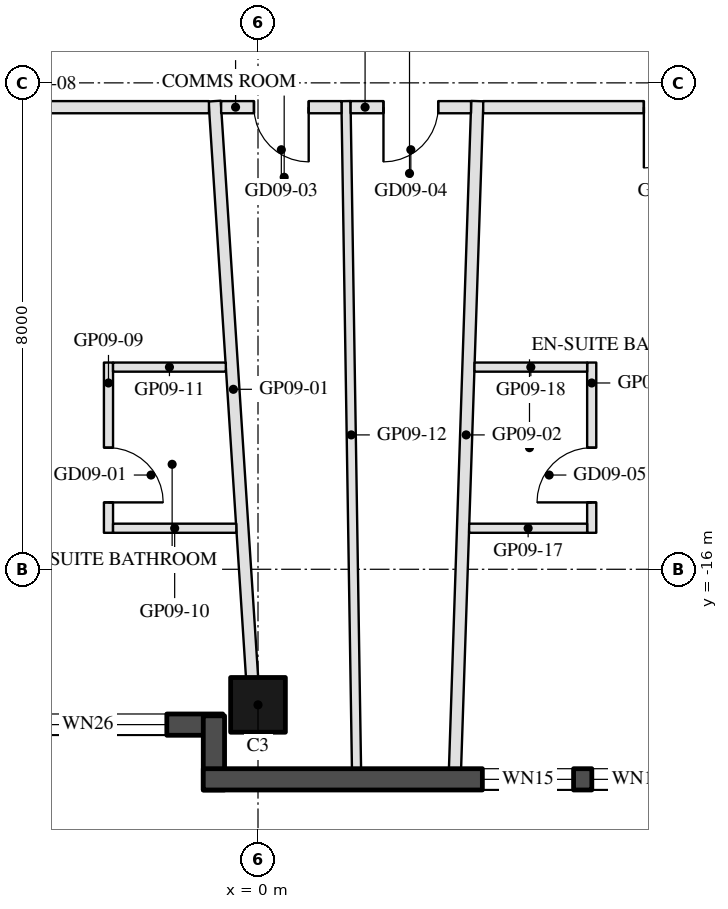
"""IFC4 building model, lengths in metres.
Left out: names, types, materials, properties, quantities, classifications, styles, units other than length and angle.
Written with IfcOpenShell. Run it as: python <this file> out.ifc"""

import sys

from ifc_helpers import new_model, si_unit, direction, frame, frame_2d, origin, origin_2d, place, context, subcontext, project, spatial, rectangle, hollow_rectangle, extrude, element, fill, save


model = new_model("IFC4")
c1 = context("Model", 3, precision=1e-05, world=origin(), true_north=direction((0.0, 1.0)))
c2 = subcontext(c1, "Body", "Model", "MODEL_VIEW")
j1 = project(units=[si_unit("LENGTHUNIT", "METRE"), si_unit("PLANEANGLEUNIT", "RADIAN")], contexts=[c1])
p1 = place(None, origin())
s1 = spatial("IfcSite", under=j1, at=p1, CompositionType="ELEMENT")
p2 = place(p1, origin())
s2 = spatial("IfcBuilding", under=s1, at=p2, CompositionType="ELEMENT")
p3 = place(p2, frame((0.0, 0.0, 109.4)))
s3 = spatial("IfcBuildingStorey", under=s2, at=p3, CompositionType="ELEMENT", Elevation=109.4)
p4 = place(p3, frame((0.0, -18.23, 0.0), z_axis=(0.0, 0.0, 1.0), x_axis=(-1.0, 0.0, 0.0)))
e1 = element("IfcColumn", 1, at=p4, inside=s3, PredefinedType="COLUMN", context=c2, shape_type="SweptSolid", body=[
    extrude(hollow_rectangle(XDim=0.9, YDim=0.9, WallThickness=0.04, at=origin_2d()), origin(), (0.0, 0.0, 1.0), 3.7),
])
p5 = place(p3, frame((-7.32, -18.555, 0.0), z_axis=(0.0, 0.0, 1.0), x_axis=(1.0, 0.0, 0.0)))
e2 = element("IfcWall", 2, at=p5, inside=s3, PredefinedType="SOLIDWALL", context=c2, shape_type="SweptSolid", body=[
    extrude(rectangle(XDim=6.74, YDim=0.35, at=frame_2d((3.37, 0.0))), origin(), (0.0, 0.0, 1.0), 3.55),
])
p6 = place(p5, frame((0.32, 0.0, 0.3)))
e3 = element("IfcOpeningElement", 3, at=p6, cuts=e2, PredefinedType="OPENING", context=c2, shape_type="SweptSolid", body=[
    extrude(rectangle(XDim=2.6, YDim=2.65, at=frame_2d((1.3, 1.325))), frame((0.0, 0.185, 0.0), z_axis=(0.0, -1.0, 0.0), x_axis=(1.0, 0.0, 0.0)), (0.0, 0.0, 1.0), 0.37),
])
p7 = place(p5, frame((3.22, 0.0, 0.3)))
e4 = element("IfcOpeningElement", 4, at=p7, cuts=e2, PredefinedType="OPENING", context=c2, shape_type="SweptSolid", body=[
    extrude(rectangle(XDim=2.6, YDim=2.65, at=frame_2d((1.3, 1.325))), frame((0.0, 0.185, 0.0), z_axis=(0.0, -1.0, 0.0), x_axis=(1.0, 0.0, 0.0)), (0.0, 0.0, 1.0), 0.37),
])
p8 = place(p3, frame((-0.725, -18.41, 0.0), z_axis=(0.0, 0.0, 1.0), x_axis=(0.0, -1.0, 0.0)))
e5 = element("IfcWall", 5, at=p8, inside=s3, PredefinedType="SOLIDWALL", context=c2, shape_type="SweptSolid", body=[
    extrude(rectangle(XDim=1.22, YDim=0.35, at=frame_2d((0.61, 0.0))), origin(), (0.0, 0.0, 1.0), 3.55),
])
p9 = place(p3, frame((-0.9, -19.455, 0.0), z_axis=(0.0, 0.0, 1.0), x_axis=(1.0, 0.0, 0.0)))
e6 = element("IfcWall", 6, at=p9, inside=s3, PredefinedType="SOLIDWALL", context=c2, shape_type="SweptSolid", body=[
    extrude(rectangle(XDim=9.7, YDim=0.35, at=frame_2d((4.85, 0.0))), origin(), (0.0, 0.0, 1.0), 3.55),
])
p10 = place(p9, frame((4.59, 0.0, 0.3)))
e7 = element("IfcOpeningElement", 7, at=p10, cuts=e6, PredefinedType="OPENING", context=c2, shape_type="SweptSolid", body=[
    extrude(rectangle(XDim=1.5, YDim=2.65, at=frame_2d((0.75, 1.325))), frame((0.0, 0.185, 0.0), z_axis=(0.0, -1.0, 0.0), x_axis=(1.0, 0.0, 0.0)), (0.0, 0.0, 1.0), 0.37),
])
p11 = place(p9, frame((6.39, 0.0, 0.3)))
e8 = element("IfcOpeningElement", 8, at=p11, cuts=e6, PredefinedType="OPENING", context=c2, shape_type="SweptSolid", body=[
    extrude(rectangle(XDim=1.5, YDim=2.65, at=frame_2d((0.75, 1.325))), frame((0.0, 0.185, 0.0), z_axis=(0.0, -1.0, 0.0), x_axis=(1.0, 0.0, 0.0)), (0.0, 0.0, 1.0), 0.37),
])
p12 = place(p3, frame((-0.097, -17.78, 0.0), z_axis=(0.0, 0.0, 1.0), x_axis=(-0.064787627283, 0.997899074732, 0.0)))
e9 = element("IfcWall", 9, at=p12, inside=s3, PredefinedType="PARTITIONING", context=c2, shape_type="SweptSolid", body=[
    extrude(rectangle(XDim=9.5, YDim=0.2, at=frame_2d((4.75, 0.0))), origin(), (0.0, 0.0, 1.0), 2.95),
])
p13 = place(p3, frame((3.24, -19.28, 0.0), z_axis=(0.0, 0.0, 1.0), x_axis=(0.033378464475, 0.99944278381, 0.0)))
e10 = element("IfcWall", 10, at=p13, inside=s3, PredefinedType="PARTITIONING", context=c2, shape_type="SweptSolid", body=[
    extrude(rectangle(XDim=10.986, YDim=0.2, at=frame_2d((5.493, 0.0))), origin(), (0.0, 0.0, 1.0), 2.96),
])
p14 = place(p3, frame((-0.807, -8.4, 0.0), z_axis=(0.0, 0.0, 1.0), x_axis=(-1.0, 0.0, 0.0)))
e11 = element("IfcWall", 11, at=p14, inside=s3, PredefinedType="PARTITIONING", context=c2, shape_type="SweptSolid", body=[
    extrude(rectangle(XDim=9.182, YDim=0.2, at=frame_2d((4.591, 0.0))), origin(), (0.0, 0.0, 1.0), 2.95),
])
p15 = place(p14, frame((4.091, 0.0, 0.0)))
e12 = element("IfcOpeningElement", 12, at=p15, cuts=e11, PredefinedType="OPENING", context=c2, shape_type="SweptSolid", body=[
    extrude(rectangle(XDim=1.0, YDim=2.1, at=frame_2d((0.5, 1.05))), frame((0.0, 0.11, 0.0), z_axis=(0.0, -1.0, 0.0), x_axis=(1.0, 0.0, 0.0)), (0.0, 0.0, 1.0), 0.22),
])
p16 = place(p3, frame((-2.459, -12.6, 0.0), z_axis=(0.0, 0.0, 1.0), x_axis=(0.0, -1.0, 0.0)))
e13 = element("IfcWall", 13, at=p16, inside=s3, PredefinedType="PARTITIONING", context=c2, shape_type="SweptSolid", body=[
    extrude(rectangle(XDim=2.8, YDim=0.15, at=frame_2d((1.4, 0.0))), origin(), (0.0, 0.0, 1.0), 3.55),
])
p17 = place(p16, frame((1.4, 0.0, 0.0)))
e14 = element("IfcOpeningElement", 14, at=p17, cuts=e13, PredefinedType="OPENING", context=c2, shape_type="SweptSolid", body=[
    extrude(rectangle(XDim=0.9, YDim=2.1, at=frame_2d((0.45, 1.05))), frame((0.0, 0.085, 0.0), z_axis=(0.0, -1.0, 0.0), x_axis=(1.0, 0.0, 0.0)), (0.0, 0.0, 1.0), 0.17),
])
p18 = place(p3, frame((-2.384, -15.325, 0.0), z_axis=(0.0, 0.0, 1.0), x_axis=(1.0, 0.0, 0.0)))
e15 = element("IfcWall", 15, at=p18, inside=s3, PredefinedType="PARTITIONING", context=c2, shape_type="SweptSolid", body=[
    extrude(rectangle(XDim=2.027, YDim=0.15, at=frame_2d((1.014, 0.0))), origin(), (0.0, 0.0, 1.0), 3.55),
])
p19 = place(p3, frame((-2.384, -12.675, 0.0), z_axis=(0.0, 0.0, 1.0), x_axis=(1.0, 0.0, 0.0)))
e16 = element("IfcWall", 16, at=p19, inside=s3, PredefinedType="PARTITIONING", context=c2, shape_type="SweptSolid", body=[
    extrude(rectangle(XDim=1.855, YDim=0.15, at=frame_2d((0.927, 0.0))), origin(), (0.0, 0.0, 1.0), 3.55),
])
p20 = place(p3, frame((1.62, -19.28, 0.0), z_axis=(0.0, 0.0, 1.0), x_axis=(-0.015784932211, 0.999875410196, 0.0)))
e17 = element("IfcWall", 17, at=p20, inside=s3, PredefinedType="PARTITIONING", context=c2, shape_type="SweptSolid", body=[
    extrude(rectangle(XDim=10.981, YDim=0.15, at=frame_2d((5.491, 0.0))), origin(), (0.0, 0.0, 1.0), 2.96),
])
p21 = place(p3, frame((1.373, -8.4, 0.0), z_axis=(0.0, 0.0, 1.0), x_axis=(-1.0, 0.0, 0.0)))
e18 = element("IfcWall", 18, at=p21, inside=s3, PredefinedType="PARTITIONING", context=c2, shape_type="SweptSolid", body=[
    extrude(rectangle(XDim=1.979, YDim=0.2, at=frame_2d((0.99, 0.0))), origin(), (0.0, 0.0, 1.0), 2.95),
])
p22 = place(p21, frame((0.54, 0.0, 0.0)))
e19 = element("IfcOpeningElement", 19, at=p22, cuts=e18, PredefinedType="OPENING", context=c2, shape_type="SweptSolid", body=[
    extrude(rectangle(XDim=0.9, YDim=2.1, at=frame_2d((0.45, 1.05))), frame((0.0, 0.11, 0.0), z_axis=(0.0, -1.0, 0.0), x_axis=(1.0, 0.0, 0.0)), (0.0, 0.0, 1.0), 0.22),
])
p23 = place(p3, frame((3.503, -8.4, 0.0), z_axis=(0.0, 0.0, 1.0), x_axis=(-1.0, 0.0, 0.0)))
e20 = element("IfcWall", 20, at=p23, inside=s3, PredefinedType="PARTITIONING", context=c2, shape_type="SweptSolid", body=[
    extrude(rectangle(XDim=1.98, YDim=0.2, at=frame_2d((0.99, 0.0))), origin(), (0.0, 0.0, 1.0), 3.55),
])
p24 = place(p23, frame((0.54, 0.0, 0.0)))
e21 = element("IfcOpeningElement", 21, at=p24, cuts=e20, PredefinedType="OPENING", context=c2, shape_type="SweptSolid", body=[
    extrude(rectangle(XDim=0.9, YDim=2.1, at=frame_2d((0.45, 1.05))), frame((0.0, 0.11, 0.0), z_axis=(0.0, -1.0, 0.0), x_axis=(1.0, 0.0, 0.0)), (0.0, 0.0, 1.0), 0.22),
])
p25 = place(p3, frame((9.988, -8.4, 0.0), z_axis=(0.0, 0.0, 1.0), x_axis=(-1.0, 0.0, 0.0)))
e22 = element("IfcWall", 22, at=p25, inside=s3, PredefinedType="PARTITIONING", context=c2, shape_type="SweptSolid", body=[
    extrude(rectangle(XDim=6.285, YDim=0.2, at=frame_2d((3.143, 0.0))), origin(), (0.0, 0.0, 1.0), 2.95),
])
p26 = place(p25, frame((2.642, 0.0, 0.0)))
e23 = element("IfcOpeningElement", 23, at=p26, cuts=e22, PredefinedType="OPENING", context=c2, shape_type="SweptSolid", body=[
    extrude(rectangle(XDim=1.0, YDim=2.1, at=frame_2d((0.5, 1.05))), frame((0.0, 0.11, 0.0), z_axis=(0.0, -1.0, 0.0), x_axis=(1.0, 0.0, 0.0)), (0.0, 0.0, 1.0), 0.22),
])
p27 = place(p3, frame((5.488, -15.4, 0.0), z_axis=(0.0, 0.0, 1.0), x_axis=(0.0, 1.0, 0.0)))
e24 = element("IfcWall", 24, at=p27, inside=s3, PredefinedType="PARTITIONING", context=c2, shape_type="SweptSolid", body=[
    extrude(rectangle(XDim=2.8, YDim=0.15, at=frame_2d((1.4, 0.0))), origin(), (0.0, 0.0, 1.0), 3.55),
])
p28 = place(p27, frame((0.5, 0.0, 0.0)))
e25 = element("IfcOpeningElement", 25, at=p28, cuts=e24, PredefinedType="OPENING", context=c2, shape_type="SweptSolid", body=[
    extrude(rectangle(XDim=0.9, YDim=2.1, at=frame_2d((0.45, 1.05))), frame((0.0, 0.085, 0.0), z_axis=(0.0, -1.0, 0.0), x_axis=(1.0, 0.0, 0.0)), (0.0, 0.0, 1.0), 0.17),
])
p29 = place(p3, frame((3.472, -15.325, 0.0), z_axis=(0.0, 0.0, 1.0), x_axis=(1.0, 0.0, 0.0)))
e26 = element("IfcWall", 26, at=p29, inside=s3, PredefinedType="PARTITIONING", context=c2, shape_type="SweptSolid", body=[
    extrude(rectangle(XDim=1.941, YDim=0.15, at=frame_2d((0.97, 0.0))), origin(), (0.0, 0.0, 1.0), 2.95),
])
p30 = place(p3, frame((3.561, -12.675, 0.0), z_axis=(0.0, 0.0, 1.0), x_axis=(1.0, 0.0, 0.0)))
e27 = element("IfcWall", 27, at=p30, inside=s3, PredefinedType="PARTITIONING", context=c2, shape_type="SweptSolid", body=[
    extrude(rectangle(XDim=1.853, YDim=0.15, at=frame_2d((0.926, 0.0))), origin(), (0.0, 0.0, 1.0), 2.95),
])
p31 = place(p7, origin())
e28 = element("IfcWindow", 28, at=p31, inside=s3, PartitioningType="SINGLE_PANEL", PredefinedType="WINDOW", context=c2, shape_type="SweptSolid", body=[
    extrude(rectangle(XDim=2.6, YDim=2.65, at=frame_2d((1.3, 1.325))), frame((0.0, 0.03, 0.0), z_axis=(0.0, -1.0, 0.0), x_axis=(1.0, 0.0, 0.0)), (0.0, 0.0, 1.0), 0.06),
])
fill(e4, e28)
p32 = place(p10, origin())
e29 = element("IfcWindow", 29, at=p32, inside=s3, PartitioningType="SINGLE_PANEL", PredefinedType="WINDOW", context=c2, shape_type="SweptSolid", body=[
    extrude(rectangle(XDim=1.5, YDim=2.65, at=frame_2d((0.75, 1.325))), frame((0.0, 0.03, 0.0), z_axis=(0.0, -1.0, 0.0), x_axis=(1.0, 0.0, 0.0)), (0.0, 0.0, 1.0), 0.06),
])
fill(e7, e29)
p33 = place(p11, origin())
e30 = element("IfcWindow", 30, at=p33, inside=s3, PartitioningType="SINGLE_PANEL", PredefinedType="WINDOW", context=c2, shape_type="SweptSolid", body=[
    extrude(rectangle(XDim=1.5, YDim=2.65, at=frame_2d((0.75, 1.325))), frame((0.0, 0.03, 0.0), z_axis=(0.0, -1.0, 0.0), x_axis=(1.0, 0.0, 0.0)), (0.0, 0.0, 1.0), 0.06),
])
fill(e8, e30)
p34 = place(p17, origin())
e31 = element("IfcDoor", 31, at=p34, inside=s3, OperationType="SINGLE_SWING_RIGHT", PredefinedType="DOOR", context=c2, shape_type="SweptSolid", body=[
    extrude(rectangle(XDim=0.9, YDim=2.1, at=frame_2d((0.45, 1.05))), frame((0.0, 0.025, 0.0), z_axis=(0.0, -1.0, 0.0), x_axis=(1.0, 0.0, 0.0)), (0.0, 0.0, 1.0), 0.05),
])
fill(e14, e31)
p35 = place(p22, origin())
e32 = element("IfcDoor", 32, at=p35, inside=s3, OperationType="SINGLE_SWING_LEFT", PredefinedType="DOOR", context=c2, shape_type="SweptSolid", body=[
    extrude(rectangle(XDim=0.9, YDim=2.1, at=frame_2d((0.45, 1.05))), frame((0.0, 0.025, 0.0), z_axis=(0.0, -1.0, 0.0), x_axis=(1.0, 0.0, 0.0)), (0.0, 0.0, 1.0), 0.05),
])
fill(e19, e32)
p36 = place(p24, origin())
e33 = element("IfcDoor", 33, at=p36, inside=s3, OperationType="SINGLE_SWING_RIGHT", PredefinedType="DOOR", context=c2, shape_type="SweptSolid", body=[
    extrude(rectangle(XDim=0.9, YDim=2.1, at=frame_2d((0.45, 1.05))), frame((0.0, 0.025, 0.0), z_axis=(0.0, -1.0, 0.0), x_axis=(1.0, 0.0, 0.0)), (0.0, 0.0, 1.0), 0.05),
])
fill(e21, e33)
p37 = place(p28, origin())
e34 = element("IfcDoor", 34, at=p37, inside=s3, OperationType="SINGLE_SWING_LEFT", PredefinedType="DOOR", context=c2, shape_type="SweptSolid", body=[
    extrude(rectangle(XDim=0.9, YDim=2.1, at=frame_2d((0.45, 1.05))), frame((0.0, 0.025, 0.0), z_axis=(0.0, -1.0, 0.0), x_axis=(1.0, 0.0, 0.0)), (0.0, 0.0, 1.0), 0.05),
])
fill(e25, e34)
p38 = place(p26, origin())
e35 = element("IfcDoor", 35, at=p38, inside=s3, OperationType="SINGLE_SWING_RIGHT", PredefinedType="DOOR", context=c2, shape_type="SweptSolid", body=[
    extrude(rectangle(XDim=1.0, YDim=2.1, at=frame_2d((0.5, 1.05))), frame((0.0, 0.025, 0.0), z_axis=(0.0, -1.0, 0.0), x_axis=(1.0, 0.0, 0.0)), (0.0, 0.0, 1.0), 0.05),
])
fill(e23, e35)
save(model, sys.argv[1])
